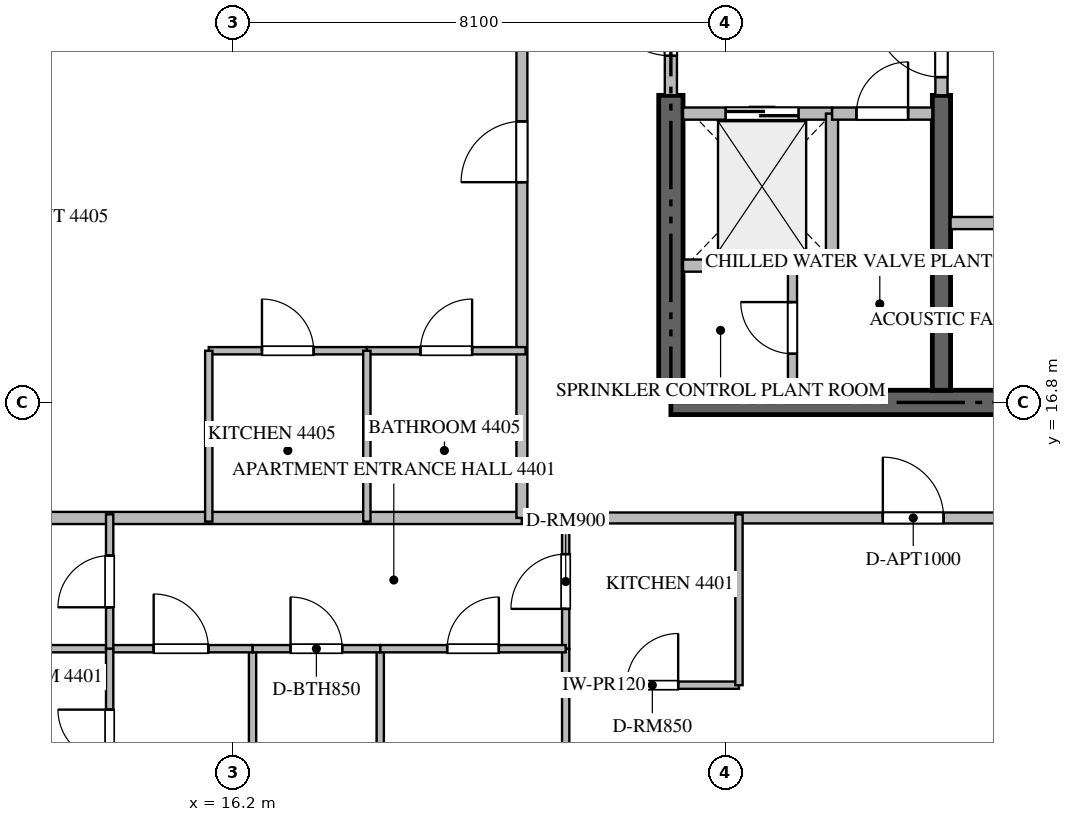
"""IFC4 building model, lengths in metres.
Left out: names, types, materials, properties, quantities, classifications, styles, units other than length and angle.
Written with IfcOpenShell. Run it as: python <this file> out.ifc"""

import sys

from ifc_helpers import new_model, si_unit, direction, frame, frame_2d, origin, place, context, subcontext, project, spatial, rectangle, extrude, source, transform, mapped, element, fill, save


model = new_model("IFC4")
c1 = context("Model", 3, precision=1e-05, world=origin(), true_north=direction((0.0, 1.0)))
c2 = subcontext(c1, "Body", "Model", "MODEL_VIEW")
j1 = project(units=[si_unit("LENGTHUNIT", "METRE"), si_unit("PLANEANGLEUNIT", "RADIAN")], contexts=[c1])
p1 = place(None, origin())
s1 = spatial("IfcSite", under=j1, at=p1, CompositionType="ELEMENT")
p2 = place(p1, origin())
s2 = spatial("IfcBuilding", under=s1, at=p2, CompositionType="ELEMENT")
p3 = place(p2, frame((0.0, 0.0, 176.4)))
s3 = spatial("IfcBuildingStorey", under=s2, at=p3, CompositionType="ELEMENT", Elevation=176.4)
p4 = place(p3, frame((23.4, 16.8, -0.26), z_axis=(0.0, 0.0, 1.0), x_axis=(1.0, 0.0, 0.0)))
e1 = element("IfcWall", 1, at=p4, inside=s3, PredefinedType="SHEAR", context=c2, shape_type="SweptSolid", body=[
    extrude(rectangle(XDim=18.0, YDim=0.4, at=frame_2d((9.0, 0.0))), origin(), (0.0, 0.0, 1.0), 3.748),
])
p5 = place(p3, frame((23.4, 17.0, -0.26), z_axis=(0.0, 0.0, 1.0), x_axis=(0.0, 1.0, 0.0)))
e2 = element("IfcWall", 2, at=p5, inside=s3, PredefinedType="SHEAR", context=c2, shape_type="SweptSolid", body=[
    extrude(rectangle(XDim=4.85, YDim=0.4, at=frame_2d((2.425, 0.0))), origin(), (0.0, 0.0, 1.0), 3.748),
])
p6 = place(p3, frame((27.85, 17.0, -0.26), z_axis=(0.0, 0.0, 1.0), x_axis=(0.0, 1.0, 0.0)))
e3 = element("IfcWall", 3, at=p6, inside=s3, PredefinedType="SHEAR", context=c2, shape_type="SweptSolid", body=[
    extrude(rectangle(XDim=4.85, YDim=0.3, at=frame_2d((2.425, 0.0))), origin(), (0.0, 0.0, 1.0), 3.748),
])
p7 = place(p3, frame((23.6, 21.55, 0.0), z_axis=(0.0, 0.0, 1.0), x_axis=(1.0, 0.0, 0.0)))
e4 = element("IfcWall", 4, at=p7, inside=s3, PredefinedType="STANDARD", context=c2, shape_type="SweptSolid", body=[
    extrude(rectangle(XDim=2.45, YDim=0.2, at=frame_2d((1.225, 0.0))), origin(), (0.0, 0.0, 1.0), 3.49),
])
p8 = place(p7, frame((0.7, 0.0, 0.0)))
e5 = element("IfcOpeningElement", 5, at=p8, cuts=e4, PredefinedType="OPENING", context=c2, shape_type="SweptSolid", body=[
    extrude(rectangle(XDim=1.2, YDim=2.2, at=frame_2d((0.6, 1.1))), frame((0.0, 0.11, 0.0), z_axis=(0.0, -1.0, 0.0), x_axis=(1.0, 0.0, 0.0)), (0.0, 0.0, 1.0), 0.22),
])
p9 = place(p3, frame((26.05, 19.05, 0.0), z_axis=(0.0, 0.0, 1.0), x_axis=(0.0, 1.0, 0.0)))
e6 = element("IfcWall", 6, at=p9, inside=s3, PredefinedType="STANDARD", context=c2, shape_type="SweptSolid", body=[
    extrude(rectangle(XDim=2.5, YDim=0.2, at=frame_2d((1.25, 0.0))), origin(), (0.0, 0.0, 1.0), 3.49),
])
p10 = place(p3, frame((23.6, 19.05, 0.0), z_axis=(0.0, 0.0, 1.0), x_axis=(1.0, 0.0, 0.0)))
e7 = element("IfcWall", 7, at=p10, inside=s3, PredefinedType="STANDARD", context=c2, shape_type="SweptSolid", body=[
    extrude(rectangle(XDim=2.45, YDim=0.2, at=frame_2d((1.225, 0.0))), origin(), (0.0, 0.0, 1.0), 3.49),
])
p11 = place(p3, frame((26.052, 21.55, 0.0), z_axis=(0.0, 0.0, 1.0), x_axis=(1.0, 0.0, 0.0)))
e8 = element("IfcWall", 8, at=p11, inside=s3, PredefinedType="STANDARD", context=c2, shape_type="SweptSolid", body=[
    extrude(rectangle(XDim=1.648, YDim=0.2, at=frame_2d((0.824, 0.0))), origin(), (0.0, 0.0, 1.0), 3.49),
])
p12 = place(p11, frame((0.399, 0.0, 0.0)))
e9 = element("IfcOpeningElement", 9, at=p12, cuts=e8, PredefinedType="OPENING", context=c2, shape_type="SweptSolid", body=[
    extrude(rectangle(XDim=0.85, YDim=2.1, at=frame_2d((0.425, 1.05))), frame((0.0, 0.11, 0.0), z_axis=(0.0, -1.0, 0.0), x_axis=(1.0, 0.0, 0.0)), (0.0, 0.0, 1.0), 0.22),
])
p13 = place(p3, frame((23.4, 21.852, 0.0), z_axis=(0.0, 0.0, 1.0), x_axis=(0.0, 1.0, 0.0)))
e10 = element("IfcWall", 10, at=p13, inside=s3, PredefinedType="STANDARD", context=c2, shape_type="SweptSolid", body=[
    extrude(rectangle(XDim=2.396, YDim=0.2, at=frame_2d((1.198, 0.0))), origin(), (0.0, 0.0, 1.0), 3.49),
])
p14 = place(p13, frame((0.648, 0.0, 0.0)))
e11 = element("IfcOpeningElement", 11, at=p14, cuts=e10, PredefinedType="OPENING", context=c2, shape_type="SweptSolid", body=[
    extrude(rectangle(XDim=1.1, YDim=2.15, at=frame_2d((0.55, 1.075))), frame((0.0, 0.11, 0.0), z_axis=(0.0, -1.0, 0.0), x_axis=(1.0, 0.0, 0.0)), (0.0, 0.0, 1.0), 0.22),
])
p15 = place(p3, frame((27.85, 21.852, 0.0), z_axis=(0.0, 0.0, 1.0), x_axis=(0.0, 1.0, 0.0)))
e12 = element("IfcWall", 12, at=p15, inside=s3, PredefinedType="STANDARD", context=c2, shape_type="SweptSolid", body=[
    extrude(rectangle(XDim=1.696, YDim=0.2, at=frame_2d((0.848, 0.0))), origin(), (0.0, 0.0, 1.0), 3.49),
])
p16 = place(p15, frame((0.298, 0.0, 0.0)))
e13 = element("IfcOpeningElement", 13, at=p16, cuts=e12, PredefinedType="OPENING", context=c2, shape_type="SweptSolid", body=[
    extrude(rectangle(XDim=1.1, YDim=2.15, at=frame_2d((0.55, 1.075))), frame((0.0, 0.11, 0.0), z_axis=(0.0, -1.0, 0.0), x_axis=(1.0, 0.0, 0.0)), (0.0, 0.0, 1.0), 0.22),
])
p17 = place(p3, frame((25.4, 17.0, 0.0), z_axis=(0.0, 0.0, 1.0), x_axis=(0.0, 1.0, 0.0)))
e14 = element("IfcWall", 14, at=p17, inside=s3, PredefinedType="PARTITIONING", context=c2, shape_type="SweptSolid", body=[
    extrude(rectangle(XDim=2.05, YDim=0.15, at=frame_2d((1.025, 0.0))), origin(), (0.0, 0.0, 1.0), 3.49),
])
p18 = place(p17, frame((0.6, 0.0, 0.0)))
e15 = element("IfcOpeningElement", 15, at=p18, cuts=e14, PredefinedType="OPENING", context=c2, shape_type="SweptSolid", body=[
    extrude(rectangle(XDim=0.85, YDim=2.1, at=frame_2d((0.425, 1.05))), frame((0.0, 0.085, 0.0), z_axis=(0.0, -1.0, 0.0), x_axis=(1.0, 0.0, 0.0)), (0.0, 0.0, 1.0), 0.17),
])
p19 = place(p3, frame((28.0, 19.75, 0.0), z_axis=(0.0, 0.0, 1.0), x_axis=(1.0, 0.0, 0.0)))
e16 = element("IfcWall", 16, at=p19, inside=s3, PredefinedType="STANDARD", context=c2, shape_type="SweptSolid", body=[
    extrude(rectangle(XDim=4.4, YDim=0.2, at=frame_2d((2.2, 0.0))), origin(), (0.0, 0.0, 1.0), 3.49),
])
p20 = place(p19, frame((1.75, 0.0, 0.0)))
e17 = element("IfcOpeningElement", 17, at=p20, cuts=e16, PredefinedType="OPENING", context=c2, shape_type="SweptSolid", body=[
    extrude(rectangle(XDim=0.9, YDim=2.1, at=frame_2d((0.45, 1.05))), frame((0.0, 0.11, 0.0), z_axis=(0.0, -1.0, 0.0), x_axis=(1.0, 0.0, 0.0)), (0.0, 0.0, 1.0), 0.22),
])
p21 = place(p3, frame((7.882, 14.9, 0.0), z_axis=(0.0, 0.0, 1.0), x_axis=(1.0, 0.0, 0.0)))
e18 = element("IfcWall", 18, at=p21, inside=s3, PredefinedType="PARTITIONING", context=c2, shape_type="SweptSolid", body=[
    extrude(rectangle(XDim=13.068, YDim=0.2, at=frame_2d((6.534, 0.0))), origin(), (0.0, 0.0, 1.0), 3.49),
])
p22 = place(p3, frame((20.952, 14.9, 0.0), z_axis=(0.0, 0.0, 1.0), x_axis=(1.0, 0.0, 0.0)))
e19 = element("IfcWall", 19, at=p22, inside=s3, PredefinedType="PARTITIONING", context=c2, shape_type="SweptSolid", body=[
    extrude(rectangle(XDim=22.896, YDim=0.18, at=frame_2d((11.448, 0.0))), origin(), (0.0, 0.0, 1.0), 3.49),
])
p23 = place(p22, frame((5.934, 0.0, 0.0)))
e20 = element("IfcOpeningElement", 20, at=p23, cuts=e19, PredefinedType="OPENING", context=c2, shape_type="SweptSolid", body=[
    extrude(rectangle(XDim=1.0, YDim=2.15, at=frame_2d((0.5, 1.075))), frame((0.0, 0.1, 0.0), z_axis=(0.0, -1.0, 0.0), x_axis=(1.0, 0.0, 0.0)), (0.0, 0.0, 1.0), 0.2),
])
p24 = place(p22, frame((16.51, 0.0, 0.0)))
e21 = element("IfcOpeningElement", 21, at=p24, cuts=e19, PredefinedType="OPENING", context=c2, shape_type="SweptSolid", body=[
    extrude(rectangle(XDim=1.0, YDim=2.15, at=frame_2d((0.5, 1.075))), frame((0.0, 0.1, 0.0), z_axis=(0.0, -1.0, 0.0), x_axis=(1.0, 0.0, 0.0)), (0.0, 0.0, 1.0), 0.2),
])
p25 = place(p3, frame((20.95, 14.9, 0.0), z_axis=(0.0, 0.0, 1.0), x_axis=(0.0, 1.0, 0.0)))
e22 = element("IfcWall", 22, at=p25, inside=s3, PredefinedType="PARTITIONING", context=c2, shape_type="SweptSolid", body=[
    extrude(rectangle(XDim=18.7, YDim=0.18, at=frame_2d((9.35, 0.0))), origin(), (0.0, 0.0, 1.0), 3.49),
])
p26 = place(p25, frame((5.522, 0.0, 0.0)))
e23 = element("IfcOpeningElement", 23, at=p26, cuts=e22, PredefinedType="OPENING", context=c2, shape_type="SweptSolid", body=[
    extrude(rectangle(XDim=1.0, YDim=2.15, at=frame_2d((0.5, 1.075))), frame((0.0, 0.1, 0.0), z_axis=(0.0, -1.0, 0.0), x_axis=(1.0, 0.0, 0.0)), (0.0, 0.0, 1.0), 0.2),
])
p27 = place(p25, frame((10.602, 0.0, 0.0)))
e24 = element("IfcOpeningElement", 24, at=p27, cuts=e22, PredefinedType="OPENING", context=c2, shape_type="SweptSolid", body=[
    extrude(rectangle(XDim=1.0, YDim=2.15, at=frame_2d((0.5, 1.075))), frame((0.0, 0.1, 0.0), z_axis=(0.0, -1.0, 0.0), x_axis=(1.0, 0.0, 0.0)), (0.0, 0.0, 1.0), 0.2),
])
p28 = place(p3, frame((21.67, 12.15, 0.0), z_axis=(0.0, 0.0, 1.0), x_axis=(1.0, 0.0, 0.0)))
e25 = element("IfcWall", 25, at=p28, inside=s3, PredefinedType="PARTITIONING", context=c2, shape_type="SweptSolid", body=[
    extrude(rectangle(XDim=2.85, YDim=0.12, at=frame_2d((1.425, 0.0))), origin(), (0.0, 0.0, 1.0), 3.49),
])
p29 = place(p28, frame((1.0, 0.0, 0.0)))
e26 = element("IfcOpeningElement", 26, at=p29, cuts=e25, PredefinedType="OPENING", context=c2, shape_type="SweptSolid", body=[
    extrude(rectangle(XDim=0.85, YDim=2.1, at=frame_2d((0.425, 1.05))), frame((0.0, 0.07, 0.0), z_axis=(0.0, -1.0, 0.0), x_axis=(1.0, 0.0, 0.0)), (0.0, 0.0, 1.0), 0.14),
])
p30 = place(p3, frame((24.52, 12.15, 0.0), z_axis=(0.0, 0.0, 1.0), x_axis=(0.0, 1.0, 0.0)))
e27 = element("IfcWall", 27, at=p30, inside=s3, PredefinedType="PARTITIONING", context=c2, shape_type="SweptSolid", body=[
    extrude(rectangle(XDim=2.81, YDim=0.12, at=frame_2d((1.405, 0.0))), origin(), (0.0, 0.0, 1.0), 3.49),
])
p31 = place(p3, frame((21.67, 12.75, 0.0), z_axis=(0.0, 0.0, 1.0), x_axis=(0.0, 1.0, 0.0)))
e28 = element("IfcWall", 28, at=p31, inside=s3, PredefinedType="PARTITIONING", context=c2, shape_type="SweptSolid", body=[
    extrude(rectangle(XDim=2.21, YDim=0.12, at=frame_2d((1.105, 0.0))), origin(), (0.0, 0.0, 1.0), 3.49),
])
p32 = place(p31, frame((0.655, 0.0, 0.0)))
e29 = element("IfcOpeningElement", 29, at=p32, cuts=e28, PredefinedType="OPENING", context=c2, shape_type="SweptSolid", body=[
    extrude(rectangle(XDim=0.9, YDim=2.1, at=frame_2d((0.45, 1.05))), frame((0.0, 0.07, 0.0), z_axis=(0.0, -1.0, 0.0), x_axis=(1.0, 0.0, 0.0)), (0.0, 0.0, 1.0), 0.14),
])
p33 = place(p3, frame((21.67, 8.065, 0.0), z_axis=(0.0, 0.0, 1.0), x_axis=(0.0, 1.0, 0.0)))
e30 = element("IfcWall", 30, at=p33, inside=s3, PredefinedType="PARTITIONING", context=c2, shape_type="SweptSolid", body=[
    extrude(rectangle(XDim=4.683, YDim=0.12, at=frame_2d((2.342, 0.0))), origin(), (0.0, 0.0, 1.0), 3.49),
])
p34 = place(p3, frame((16.52, 1.495, 0.0), z_axis=(0.0, 0.0, 1.0), x_axis=(0.0, 1.0, 0.0)))
e31 = element("IfcWall", 31, at=p34, inside=s3, PredefinedType="PARTITIONING", context=c2, shape_type="SweptSolid", body=[
    extrude(rectangle(XDim=11.255, YDim=0.12, at=frame_2d((5.627, 0.0))), origin(), (0.0, 0.0, 1.0), 2.972),
])
p35 = place(p3, frame((18.62, 8.063, 0.0), z_axis=(0.0, 0.0, 1.0), x_axis=(0.0, 1.0, 0.0)))
e32 = element("IfcWall", 32, at=p35, inside=s3, PredefinedType="PARTITIONING", context=c2, shape_type="SweptSolid", body=[
    extrude(rectangle(XDim=4.687, YDim=0.12, at=frame_2d((2.344, 0.0))), origin(), (0.0, 0.0, 1.0), 3.49),
])
p36 = place(p3, frame((16.52, 12.75, 0.0), z_axis=(0.0, 0.0, 1.0), x_axis=(1.0, 0.0, 0.0)))
e33 = element("IfcWall", 33, at=p36, inside=s3, PredefinedType="PARTITIONING", context=c2, shape_type="SweptSolid", body=[
    extrude(rectangle(XDim=2.1, YDim=0.12, at=frame_2d((1.05, 0.0))), origin(), (0.0, 0.0, 1.0), 3.49),
])
p37 = place(p36, frame((0.625, 0.0, 0.0)))
e34 = element("IfcOpeningElement", 34, at=p37, cuts=e33, PredefinedType="OPENING", context=c2, shape_type="SweptSolid", body=[
    extrude(rectangle(XDim=0.85, YDim=2.1, at=frame_2d((0.425, 1.05))), frame((0.0, 0.07, 0.0), z_axis=(0.0, -1.0, 0.0), x_axis=(1.0, 0.0, 0.0)), (0.0, 0.0, 1.0), 0.14),
])
p38 = place(p3, frame((18.622, 12.75, 0.0), z_axis=(0.0, 0.0, 1.0), x_axis=(1.0, 0.0, 0.0)))
e35 = element("IfcWall", 35, at=p38, inside=s3, PredefinedType="PARTITIONING", context=c2, shape_type="SweptSolid", body=[
    extrude(rectangle(XDim=3.048, YDim=0.12, at=frame_2d((1.524, 0.0))), origin(), (0.0, 0.0, 1.0), 3.49),
])
p39 = place(p38, frame((1.099, 0.0, 0.0)))
e36 = element("IfcOpeningElement", 36, at=p39, cuts=e35, PredefinedType="OPENING", context=c2, shape_type="SweptSolid", body=[
    extrude(rectangle(XDim=0.85, YDim=2.1, at=frame_2d((0.425, 1.05))), frame((0.0, 0.07, 0.0), z_axis=(0.0, -1.0, 0.0), x_axis=(1.0, 0.0, 0.0)), (0.0, 0.0, 1.0), 0.14),
])
p40 = place(p3, frame((14.17, 12.75, 0.0), z_axis=(0.0, 0.0, 1.0), x_axis=(1.0, 0.0, 0.0)))
e37 = element("IfcWall", 37, at=p40, inside=s3, PredefinedType="PARTITIONING", context=c2, shape_type="SweptSolid", body=[
    extrude(rectangle(XDim=2.348, YDim=0.12, at=frame_2d((1.174, 0.0))), origin(), (0.0, 0.0, 1.0), 3.49),
])
p41 = place(p40, frame((0.724, 0.0, 0.0)))
e38 = element("IfcOpeningElement", 38, at=p41, cuts=e37, PredefinedType="OPENING", context=c2, shape_type="SweptSolid", body=[
    extrude(rectangle(XDim=0.9, YDim=2.1, at=frame_2d((0.45, 1.05))), frame((0.0, 0.07, 0.0), z_axis=(0.0, -1.0, 0.0), x_axis=(1.0, 0.0, 0.0)), (0.0, 0.0, 1.0), 0.14),
])
p42 = place(p3, frame((10.47, 12.75, 0.0), z_axis=(0.0, 0.0, 1.0), x_axis=(1.0, 0.0, 0.0)))
e39 = element("IfcWall", 39, at=p42, inside=s3, PredefinedType="PARTITIONING", context=c2, shape_type="SweptSolid", body=[
    extrude(rectangle(XDim=3.698, YDim=0.12, at=frame_2d((1.849, 0.0))), origin(), (0.0, 0.0, 1.0), 3.49),
])
p43 = place(p3, frame((14.17, 9.895, 0.0), z_axis=(0.0, 0.0, 1.0), x_axis=(0.0, 1.0, 0.0)))
e40 = element("IfcWall", 40, at=p43, inside=s3, PredefinedType="PARTITIONING", context=c2, shape_type="SweptSolid", body=[
    extrude(rectangle(XDim=2.855, YDim=0.12, at=frame_2d((1.427, 0.0))), origin(), (0.0, 0.0, 1.0), 3.49),
])
p44 = place(p43, frame((1.003, 0.0, 0.0)))
e41 = element("IfcOpeningElement", 41, at=p44, cuts=e40, PredefinedType="OPENING", context=c2, shape_type="SweptSolid", body=[
    extrude(rectangle(XDim=0.85, YDim=2.1, at=frame_2d((0.425, 1.05))), frame((0.0, 0.07, 0.0), z_axis=(0.0, -1.0, 0.0), x_axis=(1.0, 0.0, 0.0)), (0.0, 0.0, 1.0), 0.14),
])
p45 = place(p3, frame((14.17, 12.752, 0.0), z_axis=(0.0, 0.0, 1.0), x_axis=(0.0, 1.0, 0.0)))
e42 = element("IfcWall", 42, at=p45, inside=s3, PredefinedType="PARTITIONING", context=c2, shape_type="SweptSolid", body=[
    extrude(rectangle(XDim=2.208, YDim=0.12, at=frame_2d((1.104, 0.0))), origin(), (0.0, 0.0, 1.0), 3.49),
])
p46 = place(p45, frame((0.679, 0.0, 0.0)))
e43 = element("IfcOpeningElement", 43, at=p46, cuts=e42, PredefinedType="OPENING", context=c2, shape_type="SweptSolid", body=[
    extrude(rectangle(XDim=0.85, YDim=2.1, at=frame_2d((0.425, 1.05))), frame((0.0, 0.07, 0.0), z_axis=(0.0, -1.0, 0.0), x_axis=(1.0, 0.0, 0.0)), (0.0, 0.0, 1.0), 0.14),
])
p47 = place(p3, frame((15.8, 17.65, 0.0), z_axis=(0.0, 0.0, 1.0), x_axis=(1.0, 0.0, 0.0)))
e44 = element("IfcWall", 44, at=p47, inside=s3, PredefinedType="PARTITIONING", context=c2, shape_type="SweptSolid", body=[
    extrude(rectangle(XDim=2.6, YDim=0.12, at=frame_2d((1.3, 0.0))), origin(), (0.0, 0.0, 1.0), 3.49),
])
p48 = place(p47, frame((0.875, 0.0, 0.0)))
e45 = element("IfcOpeningElement", 45, at=p48, cuts=e44, PredefinedType="OPENING", context=c2, shape_type="SweptSolid", body=[
    extrude(rectangle(XDim=0.85, YDim=2.1, at=frame_2d((0.425, 1.05))), frame((0.0, 0.07, 0.0), z_axis=(0.0, -1.0, 0.0), x_axis=(1.0, 0.0, 0.0)), (0.0, 0.0, 1.0), 0.14),
])
p49 = place(p3, frame((18.402, 17.65, 0.0), z_axis=(0.0, 0.0, 1.0), x_axis=(1.0, 0.0, 0.0)))
e46 = element("IfcWall", 46, at=p49, inside=s3, PredefinedType="PARTITIONING", context=c2, shape_type="SweptSolid", body=[
    extrude(rectangle(XDim=2.608, YDim=0.12, at=frame_2d((1.304, 0.0))), origin(), (0.0, 0.0, 1.0), 3.49),
])
p50 = place(p49, frame((0.879, 0.0, 0.0)))
e47 = element("IfcOpeningElement", 47, at=p50, cuts=e46, PredefinedType="OPENING", context=c2, shape_type="SweptSolid", body=[
    extrude(rectangle(XDim=0.85, YDim=2.1, at=frame_2d((0.425, 1.05))), frame((0.0, 0.07, 0.0), z_axis=(0.0, -1.0, 0.0), x_axis=(1.0, 0.0, 0.0)), (0.0, 0.0, 1.0), 0.14),
])
for number, where, z_axis, x_axis in (
    (48, (18.4, 14.84, 0.0), (0.0, 0.0, 1.0), (0.0, 1.0, 0.0)),
    (49, (15.8, 14.84, 0.0), (0.0, 0.0, 1.0), (0.0, 1.0, 0.0)),
):
    element("IfcWall", number, at=place(p3, frame(where, z_axis=z_axis, x_axis=x_axis)), inside=s3, PredefinedType="PARTITIONING", context=c2, shape_type="SweptSolid", body=[
        extrude(rectangle(XDim=2.81, YDim=0.12, at=frame_2d((1.405, 0.0))), origin(), (0.0, 0.0, 1.0), 3.49),
    ])
m1 = source(origin(), c2, "Body", "SweptSolid", [
    extrude(rectangle(XDim=1.2, YDim=2.2, at=frame_2d((0.6, 1.1))), frame((0.0, 0.025, 0.0), z_axis=(0.0, -1.0, 0.0), x_axis=(1.0, 0.0, 0.0)), (0.0, 0.0, 1.0), 0.05),
])
p51 = place(p8, origin())
e50 = element("IfcDoor", 50, at=p51, inside=s3, OperationType="DOUBLE_DOOR_SLIDING", PredefinedType="DOOR", context=c2, shape_type="MappedRepresentation", body=[
    mapped(m1, transform((0.0, 0.0, 0.0), scale=1.0)),
])
fill(e5, e50)
m2 = source(origin(), c2, "Body", "SweptSolid", [
    extrude(rectangle(XDim=0.85, YDim=2.1, at=frame_2d((0.425, 1.05))), frame((0.0, 0.025, 0.0), z_axis=(0.0, -1.0, 0.0), x_axis=(1.0, 0.0, 0.0)), (0.0, 0.0, 1.0), 0.05),
])
p52 = place(p12, origin())
e51 = element("IfcDoor", 51, at=p52, inside=s3, OperationType="SINGLE_SWING_RIGHT", PredefinedType="DOOR", context=c2, shape_type="MappedRepresentation", body=[
    mapped(m2, transform((0.0, 0.0, 0.0), scale=1.0)),
])
fill(e9, e51)
m3 = source(origin(), c2, "Body", "SweptSolid", [
    extrude(rectangle(XDim=1.1, YDim=2.15, at=frame_2d((0.55, 1.075))), frame((0.0, 0.025, 0.0), z_axis=(0.0, -1.0, 0.0), x_axis=(1.0, 0.0, 0.0)), (0.0, 0.0, 1.0), 0.05),
])
p53 = place(p14, origin())
e52 = element("IfcDoor", 52, at=p53, inside=s3, OperationType="SINGLE_SWING_RIGHT", PredefinedType="DOOR", context=c2, shape_type="MappedRepresentation", body=[
    mapped(m3, transform((0.0, 0.0, 0.0), scale=1.0)),
])
fill(e11, e52)
p54 = place(p16, origin())
e53 = element("IfcDoor", 53, at=p54, inside=s3, OperationType="SINGLE_SWING_RIGHT", PredefinedType="DOOR", context=c2, shape_type="MappedRepresentation", body=[
    mapped(m3, transform((0.0, 0.0, 0.0), scale=1.0)),
])
fill(e13, e53)
p55 = place(p18, origin())
e54 = element("IfcDoor", 54, at=p55, inside=s3, OperationType="SINGLE_SWING_RIGHT", PredefinedType="DOOR", context=c2, shape_type="MappedRepresentation", body=[
    mapped(m2, transform((0.0, 0.0, 0.0), scale=1.0)),
])
fill(e15, e54)
m4 = source(origin(), c2, "Body", "SweptSolid", [
    extrude(rectangle(XDim=1.0, YDim=2.15, at=frame_2d((0.5, 1.075))), frame((0.0, 0.025, 0.0), z_axis=(0.0, -1.0, 0.0), x_axis=(1.0, 0.0, 0.0)), (0.0, 0.0, 1.0), 0.05),
])
p56 = place(p23, origin())
e55 = element("IfcDoor", 55, at=p56, inside=s3, OperationType="SINGLE_SWING_LEFT", PredefinedType="DOOR", context=c2, shape_type="MappedRepresentation", body=[
    mapped(m4, transform((0.0, 0.0, 0.0), scale=1.0)),
])
fill(e20, e55)
p57 = place(p26, origin())
e56 = element("IfcDoor", 56, at=p57, inside=s3, OperationType="SINGLE_SWING_LEFT", PredefinedType="DOOR", context=c2, shape_type="MappedRepresentation", body=[
    mapped(m4, transform((0.0, 0.0, 0.0), scale=1.0)),
])
fill(e23, e56)
p58 = place(p29, origin())
e57 = element("IfcDoor", 57, at=p58, inside=s3, OperationType="SINGLE_SWING_RIGHT", PredefinedType="DOOR", context=c2, shape_type="MappedRepresentation", body=[
    mapped(m2, transform((0.0, 0.0, 0.0), scale=1.0)),
])
fill(e26, e57)
m5 = source(origin(), c2, "Body", "SweptSolid", [
    extrude(rectangle(XDim=0.9, YDim=2.1, at=frame_2d((0.45, 1.05))), frame((0.0, 0.025, 0.0), z_axis=(0.0, -1.0, 0.0), x_axis=(1.0, 0.0, 0.0)), (0.0, 0.0, 1.0), 0.05),
])
p59 = place(p32, origin())
e58 = element("IfcDoor", 58, at=p59, inside=s3, OperationType="SINGLE_SWING_LEFT", PredefinedType="DOOR", context=c2, shape_type="MappedRepresentation", body=[
    mapped(m5, transform((0.0, 0.0, 0.0), scale=1.0)),
])
fill(e29, e58)
p60 = place(p37, origin())
e59 = element("IfcDoor", 59, at=p60, inside=s3, OperationType="SINGLE_SWING_LEFT", PredefinedType="DOOR", context=c2, shape_type="MappedRepresentation", body=[
    mapped(m2, transform((0.0, 0.0, 0.0), scale=1.0)),
])
fill(e34, e59)
p61 = place(p39, origin())
e60 = element("IfcDoor", 60, at=p61, inside=s3, OperationType="SINGLE_SWING_RIGHT", PredefinedType="DOOR", context=c2, shape_type="MappedRepresentation", body=[
    mapped(m2, transform((0.0, 0.0, 0.0), scale=1.0)),
])
fill(e36, e60)
p62 = place(p41, origin())
e61 = element("IfcDoor", 61, at=p62, inside=s3, OperationType="SINGLE_SWING_LEFT", PredefinedType="DOOR", context=c2, shape_type="MappedRepresentation", body=[
    mapped(m5, transform((0.0, 0.0, 0.0), scale=1.0)),
])
fill(e38, e61)
p63 = place(p44, origin())
e62 = element("IfcDoor", 62, at=p63, inside=s3, OperationType="SINGLE_SWING_RIGHT", PredefinedType="DOOR", context=c2, shape_type="MappedRepresentation", body=[
    mapped(m2, transform((0.0, 0.0, 0.0), scale=1.0)),
])
fill(e41, e62)
p64 = place(p46, origin())
e63 = element("IfcDoor", 63, at=p64, inside=s3, OperationType="SINGLE_SWING_LEFT", PredefinedType="DOOR", context=c2, shape_type="MappedRepresentation", body=[
    mapped(m2, transform((0.0, 0.0, 0.0), scale=1.0)),
])
fill(e43, e63)
p65 = place(p48, origin())
e64 = element("IfcDoor", 64, at=p65, inside=s3, OperationType="SINGLE_SWING_LEFT", PredefinedType="DOOR", context=c2, shape_type="MappedRepresentation", body=[
    mapped(m2, transform((0.0, 0.0, 0.0), scale=1.0)),
])
fill(e45, e64)
p66 = place(p50, origin())
e65 = element("IfcDoor", 65, at=p66, inside=s3, OperationType="SINGLE_SWING_RIGHT", PredefinedType="DOOR", context=c2, shape_type="MappedRepresentation", body=[
    mapped(m2, transform((0.0, 0.0, 0.0), scale=1.0)),
])
fill(e47, e65)
save(model, sys.argv[1])
